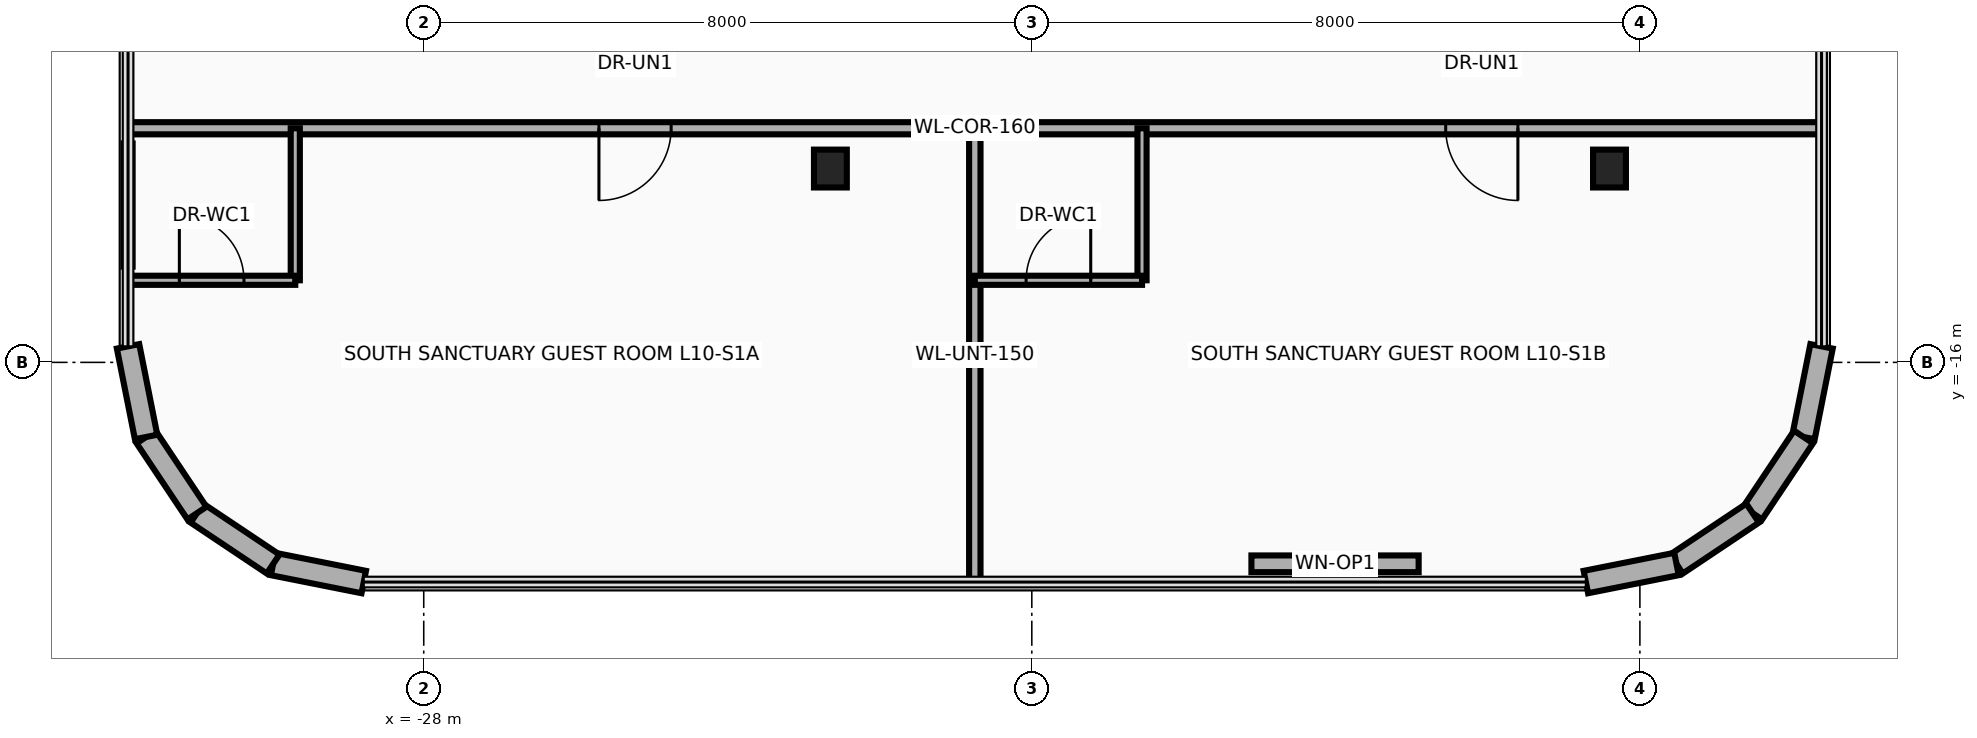
"""IFC4 building model, lengths in metres.
Left out: names, types, materials, properties, quantities, classifications, styles, units other than length and angle.
Written with IfcOpenShell. Run it as: python <this file> out.ifc"""

import sys

from ifc_helpers import new_model, si_unit, direction, frame, frame_2d, origin, origin_2d, place, context, subcontext, project, spatial, rectangle, i_section, extrude, source, transform, mapped, element, fill, save


model = new_model("IFC4")
c1 = context("Model", 3, precision=1e-05, world=origin(), true_north=direction((0.0, 1.0)))
c2 = subcontext(c1, "Body", "Model", "MODEL_VIEW")
j1 = project(units=[si_unit("LENGTHUNIT", "METRE"), si_unit("PLANEANGLEUNIT", "RADIAN")], contexts=[c1])
p1 = place(None, origin())
s1 = spatial("IfcSite", under=j1, at=p1, CompositionType="ELEMENT")
p2 = place(p1, origin())
s2 = spatial("IfcBuilding", under=s1, at=p2, CompositionType="ELEMENT")
p3 = place(p2, frame((0.0, 0.0, 44.5)))
s3 = spatial("IfcBuildingStorey", under=s2, at=p3, CompositionType="ELEMENT", Elevation=44.5)
m1 = source(origin(), c2, "Body", "SweptSolid", [
    extrude(i_section(OverallWidth=0.432, OverallDepth=0.498, WebThickness=0.056, FlangeThickness=0.089, at=origin_2d()), origin(), (0.0, 0.0, 1.0), 3.7),
])
for number, where, z_axis, x_axis in (
    (1, (-22.65, -13.45, 0.0), (0.0, 0.0, 1.0), (1.0, 0.0, 0.0)),
    (2, (-12.4, -13.45, 0.0), (0.0, 0.0, 1.0), (1.0, 0.0, 0.0)),
):
    element("IfcColumn", number, at=place(p3, frame(where, z_axis=z_axis, x_axis=x_axis)), inside=s3, PredefinedType="COLUMN", context=c2, shape_type="MappedRepresentation", body=[
        mapped(m1, transform((0.0, 0.0, 0.0), x_axis=(1.0, 0.0, 0.0), y_axis=(0.0, 1.0, 0.0), z_axis=(0.0, 0.0, 1.0), scale=1.0)),
    ])
p4 = place(p3, frame((-9.61, -15.789, 0.0), z_axis=(0.0, 0.0, 1.0), x_axis=(-0.194996050505, -0.980804027463, 0.0)))
e3 = element("IfcWall", 3, at=p4, inside=s3, PredefinedType="SOLIDWALL", context=c2, shape_type="SweptSolid", body=[
    extrude(rectangle(XDim=1.216, YDim=0.3, at=frame_2d((0.608, 0.0))), origin(), (0.0, 0.0, 1.0), 3.46),
])
for number, where, z_axis, x_axis in (
    (4, (-9.847, -16.982, 0.0), (0.0, 0.0, 1.0), (-0.556, -0.831, 0.0)),
    (5, (-10.517, -17.983, 0.0), (0.0, 0.0, 1.0), (-0.831, -0.556, 0.0)),
):
    element("IfcWall", number, at=place(p3, frame(where, z_axis=z_axis, x_axis=x_axis)), inside=s3, PredefinedType="SOLIDWALL", context=c2, shape_type="SweptSolid", body=[
        extrude(rectangle(XDim=1.205, YDim=0.3, at=frame_2d((0.603, 0.0))), origin(), (0.0, 0.0, 1.0), 3.46),
    ])
p5 = place(p3, frame((-11.518, -18.653, 0.0), z_axis=(0.0, 0.0, 1.0), x_axis=(-0.980804027463, -0.194996050505, 0.0)))
e6 = element("IfcWall", 6, at=p5, inside=s3, PredefinedType="SOLIDWALL", context=c2, shape_type="SweptSolid", body=[
    extrude(rectangle(XDim=1.216, YDim=0.3, at=frame_2d((0.608, 0.0))), origin(), (0.0, 0.0, 1.0), 3.46),
])
p6 = place(p3, frame((-14.911, -18.65, 0.0), z_axis=(0.0, 0.0, 1.0), x_axis=(-1.0, 0.0, 0.0)))
e7 = element("IfcWall", 7, at=p6, inside=s3, PredefinedType="SOLIDWALL", context=c2, shape_type="SweptSolid", body=[
    extrude(rectangle(XDim=2.2, YDim=0.22, at=frame_2d((1.1, 0.0))), origin(), (0.0, 0.0, 1.0), 3.46),
])
p7 = place(p6, frame((0.65, 0.0, 0.95)))
e8 = element("IfcOpeningElement", 8, at=p7, cuts=e7, PredefinedType="OPENING", context=c2, shape_type="SweptSolid", body=[
    extrude(rectangle(XDim=0.9, YDim=1.3, at=frame_2d((0.45, 0.65))), frame((0.0, 0.125, 0.0), z_axis=(0.0, -1.0, 0.0), x_axis=(1.0, 0.0, 0.0)), (0.0, 0.0, 1.0), 0.25),
])
p8 = place(p3, frame((-28.789, -18.89, 0.0), z_axis=(0.0, 0.0, 1.0), x_axis=(-0.980804027463, 0.194996050505, 0.0)))
e9 = element("IfcWall", 9, at=p8, inside=s3, PredefinedType="SOLIDWALL", context=c2, shape_type="SweptSolid", body=[
    extrude(rectangle(XDim=1.216, YDim=0.3, at=frame_2d((0.608, 0.0))), origin(), (0.0, 0.0, 1.0), 3.46),
])
for number, where, z_axis, x_axis in (
    (10, (-29.982, -18.653, 0.0), (0.0, 0.0, 1.0), (-0.831, 0.556, 0.0)),
    (11, (-30.983, -17.983, 0.0), (0.0, 0.0, 1.0), (-0.556, 0.831, 0.0)),
):
    element("IfcWall", number, at=place(p3, frame(where, z_axis=z_axis, x_axis=x_axis)), inside=s3, PredefinedType="SOLIDWALL", context=c2, shape_type="SweptSolid", body=[
        extrude(rectangle(XDim=1.205, YDim=0.3, at=frame_2d((0.603, 0.0))), origin(), (0.0, 0.0, 1.0), 3.46),
    ])
p9 = place(p3, frame((-31.653, -16.982, 0.0), z_axis=(0.0, 0.0, 1.0), x_axis=(-0.194996050505, 0.980804027463, 0.0)))
e12 = element("IfcWall", 12, at=p9, inside=s3, PredefinedType="SOLIDWALL", context=c2, shape_type="SweptSolid", body=[
    extrude(rectangle(XDim=1.216, YDim=0.3, at=frame_2d((0.608, 0.0))), origin(), (0.0, 0.0, 1.0), 3.46),
])
p10 = place(p3, frame((-31.89, -12.92, 0.0), z_axis=(0.0, 0.0, 1.0), x_axis=(1.0, 0.0, 0.0)))
e13 = element("IfcWall", 13, at=p10, inside=s3, PredefinedType="PARTITIONING", context=c2, shape_type="SweptSolid", body=[
    extrude(rectangle(XDim=22.28, YDim=0.16, at=frame_2d((11.14, 0.0))), origin(), (0.0, 0.0, 1.0), 2.834),
])
p11 = place(p10, frame((6.195, 0.0, 0.0)))
e14 = element("IfcOpeningElement", 14, at=p11, cuts=e13, PredefinedType="OPENING", context=c2, shape_type="SweptSolid", body=[
    extrude(rectangle(XDim=0.95, YDim=2.15, at=frame_2d((0.475, 1.075))), frame((0.0, 0.095, 0.0), z_axis=(0.0, -1.0, 0.0), x_axis=(1.0, 0.0, 0.0)), (0.0, 0.0, 1.0), 0.19),
])
p12 = place(p10, frame((17.335, 0.0, 0.0)))
e15 = element("IfcOpeningElement", 15, at=p12, cuts=e13, PredefinedType="OPENING", context=c2, shape_type="SweptSolid", body=[
    extrude(rectangle(XDim=0.95, YDim=2.15, at=frame_2d((0.475, 1.075))), frame((0.0, 0.095, 0.0), z_axis=(0.0, -1.0, 0.0), x_axis=(1.0, 0.0, 0.0)), (0.0, 0.0, 1.0), 0.19),
])
p13 = place(p3, frame((-20.75, -18.89, 0.0), z_axis=(0.0, 0.0, 1.0), x_axis=(0.0, 1.0, 0.0)))
e16 = element("IfcWall", 16, at=p13, inside=s3, PredefinedType="PARTITIONING", context=c2, shape_type="SweptSolid", body=[
    extrude(rectangle(XDim=5.97, YDim=0.15, at=frame_2d((2.985, 0.0))), origin(), (0.0, 0.0, 1.0), 2.896),
])
p14 = place(p3, frame((-29.69, -14.92, 0.0), z_axis=(0.0, 0.0, 1.0), x_axis=(0.0, 1.0, 0.0)))
e17 = element("IfcWall", 17, at=p14, inside=s3, PredefinedType="PARTITIONING", context=c2, shape_type="SweptSolid", body=[
    extrude(rectangle(XDim=2.0, YDim=0.12, at=frame_2d((1.0, 0.0))), origin(), (0.0, 0.0, 1.0), 3.46),
])
p15 = place(p3, frame((-31.89, -14.92, 0.0), z_axis=(0.0, 0.0, 1.0), x_axis=(1.0, 0.0, 0.0)))
e18 = element("IfcWall", 18, at=p15, inside=s3, PredefinedType="PARTITIONING", context=c2, shape_type="SweptSolid", body=[
    extrude(rectangle(XDim=2.2, YDim=0.12, at=frame_2d((1.1, 0.0))), origin(), (0.0, 0.0, 1.0), 3.46),
])
p16 = place(p15, frame((0.675, 0.0, 0.0)))
e19 = element("IfcOpeningElement", 19, at=p16, cuts=e18, PredefinedType="OPENING", context=c2, shape_type="SweptSolid", body=[
    extrude(rectangle(XDim=0.85, YDim=2.1, at=frame_2d((0.425, 1.05))), frame((0.0, 0.075, 0.0), z_axis=(0.0, -1.0, 0.0), x_axis=(1.0, 0.0, 0.0)), (0.0, 0.0, 1.0), 0.15),
])
p17 = place(p3, frame((-31.89, -14.74, 0.0), z_axis=(0.0, 0.0, 1.0), x_axis=(0.0, 1.0, 0.0)))
e20 = element("IfcWall", 20, at=p17, inside=s3, PredefinedType="PARTITIONING", context=c2, shape_type="SweptSolid", body=[
    extrude(rectangle(XDim=1.62, YDim=0.12, at=frame_2d((0.81, 0.0))), origin(), (0.0, 0.0, 1.0), 3.46),
])
p18 = place(p3, frame((-18.55, -14.92, 0.0), z_axis=(0.0, 0.0, 1.0), x_axis=(0.0, 1.0, 0.0)))
e21 = element("IfcWall", 21, at=p18, inside=s3, PredefinedType="PARTITIONING", context=c2, shape_type="SweptSolid", body=[
    extrude(rectangle(XDim=2.0, YDim=0.12, at=frame_2d((1.0, 0.0))), origin(), (0.0, 0.0, 1.0), 2.896),
])
p19 = place(p3, frame((-20.75, -14.92, 0.0), z_axis=(0.0, 0.0, 1.0), x_axis=(1.0, 0.0, 0.0)))
e22 = element("IfcWall", 22, at=p19, inside=s3, PredefinedType="PARTITIONING", context=c2, shape_type="SweptSolid", body=[
    extrude(rectangle(XDim=2.2, YDim=0.12, at=frame_2d((1.1, 0.0))), origin(), (0.0, 0.0, 1.0), 3.46),
])
p20 = place(p19, frame((0.675, 0.0, 0.0)))
e23 = element("IfcOpeningElement", 23, at=p20, cuts=e22, PredefinedType="OPENING", context=c2, shape_type="SweptSolid", body=[
    extrude(rectangle(XDim=0.85, YDim=2.1, at=frame_2d((0.425, 1.05))), frame((0.0, 0.075, 0.0), z_axis=(0.0, -1.0, 0.0), x_axis=(1.0, 0.0, 0.0)), (0.0, 0.0, 1.0), 0.15),
])
p21 = place(p7, origin())
e24 = element("IfcWindow", 24, at=p21, inside=s3, PartitioningType="SINGLE_PANEL", PredefinedType="WINDOW", context=c2, shape_type="SweptSolid", body=[
    extrude(rectangle(XDim=0.9, YDim=1.3, at=frame_2d((0.45, 0.65))), frame((0.0, 0.03, 0.0), z_axis=(0.0, -1.0, 0.0), x_axis=(1.0, 0.0, 0.0)), (0.0, 0.0, 1.0), 0.06),
])
fill(e8, e24)
p22 = place(p11, frame((0.95, 0.0, 0.0), z_axis=(0.0, 0.0, 1.0), x_axis=(-1.0, 0.0, 0.0)))
e25 = element("IfcDoor", 25, at=p22, inside=s3, OperationType="SINGLE_SWING_LEFT", PredefinedType="DOOR", context=c2, shape_type="SweptSolid", body=[
    extrude(rectangle(XDim=0.95, YDim=2.15, at=frame_2d((0.475, 1.075))), frame((0.0, 0.025, 0.0), z_axis=(0.0, -1.0, 0.0), x_axis=(1.0, 0.0, 0.0)), (0.0, 0.0, 1.0), 0.05),
])
fill(e14, e25)
p23 = place(p16, origin())
e26 = element("IfcDoor", 26, at=p23, inside=s3, OperationType="SINGLE_SWING_RIGHT", PredefinedType="DOOR", context=c2, shape_type="SweptSolid", body=[
    extrude(rectangle(XDim=0.85, YDim=2.1, at=frame_2d((0.425, 1.05))), frame((0.0, 0.025, 0.0), z_axis=(0.0, -1.0, 0.0), x_axis=(1.0, 0.0, 0.0)), (0.0, 0.0, 1.0), 0.05),
])
fill(e19, e26)
p24 = place(p12, frame((0.95, 0.0, 0.0), z_axis=(0.0, 0.0, 1.0), x_axis=(-1.0, 0.0, 0.0)))
e27 = element("IfcDoor", 27, at=p24, inside=s3, OperationType="SINGLE_SWING_LEFT", PredefinedType="DOOR", context=c2, shape_type="SweptSolid", body=[
    extrude(rectangle(XDim=0.95, YDim=2.15, at=frame_2d((0.475, 1.075))), frame((0.0, 0.025, 0.0), z_axis=(0.0, -1.0, 0.0), x_axis=(1.0, 0.0, 0.0)), (0.0, 0.0, 1.0), 0.05),
])
fill(e15, e27)
p25 = place(p20, origin())
e28 = element("IfcDoor", 28, at=p25, inside=s3, OperationType="SINGLE_SWING_RIGHT", PredefinedType="DOOR", context=c2, shape_type="SweptSolid", body=[
    extrude(rectangle(XDim=0.85, YDim=2.1, at=frame_2d((0.425, 1.05))), frame((0.0, 0.025, 0.0), z_axis=(0.0, -1.0, 0.0), x_axis=(1.0, 0.0, 0.0)), (0.0, 0.0, 1.0), 0.05),
])
fill(e23, e28)
save(model, sys.argv[1])
